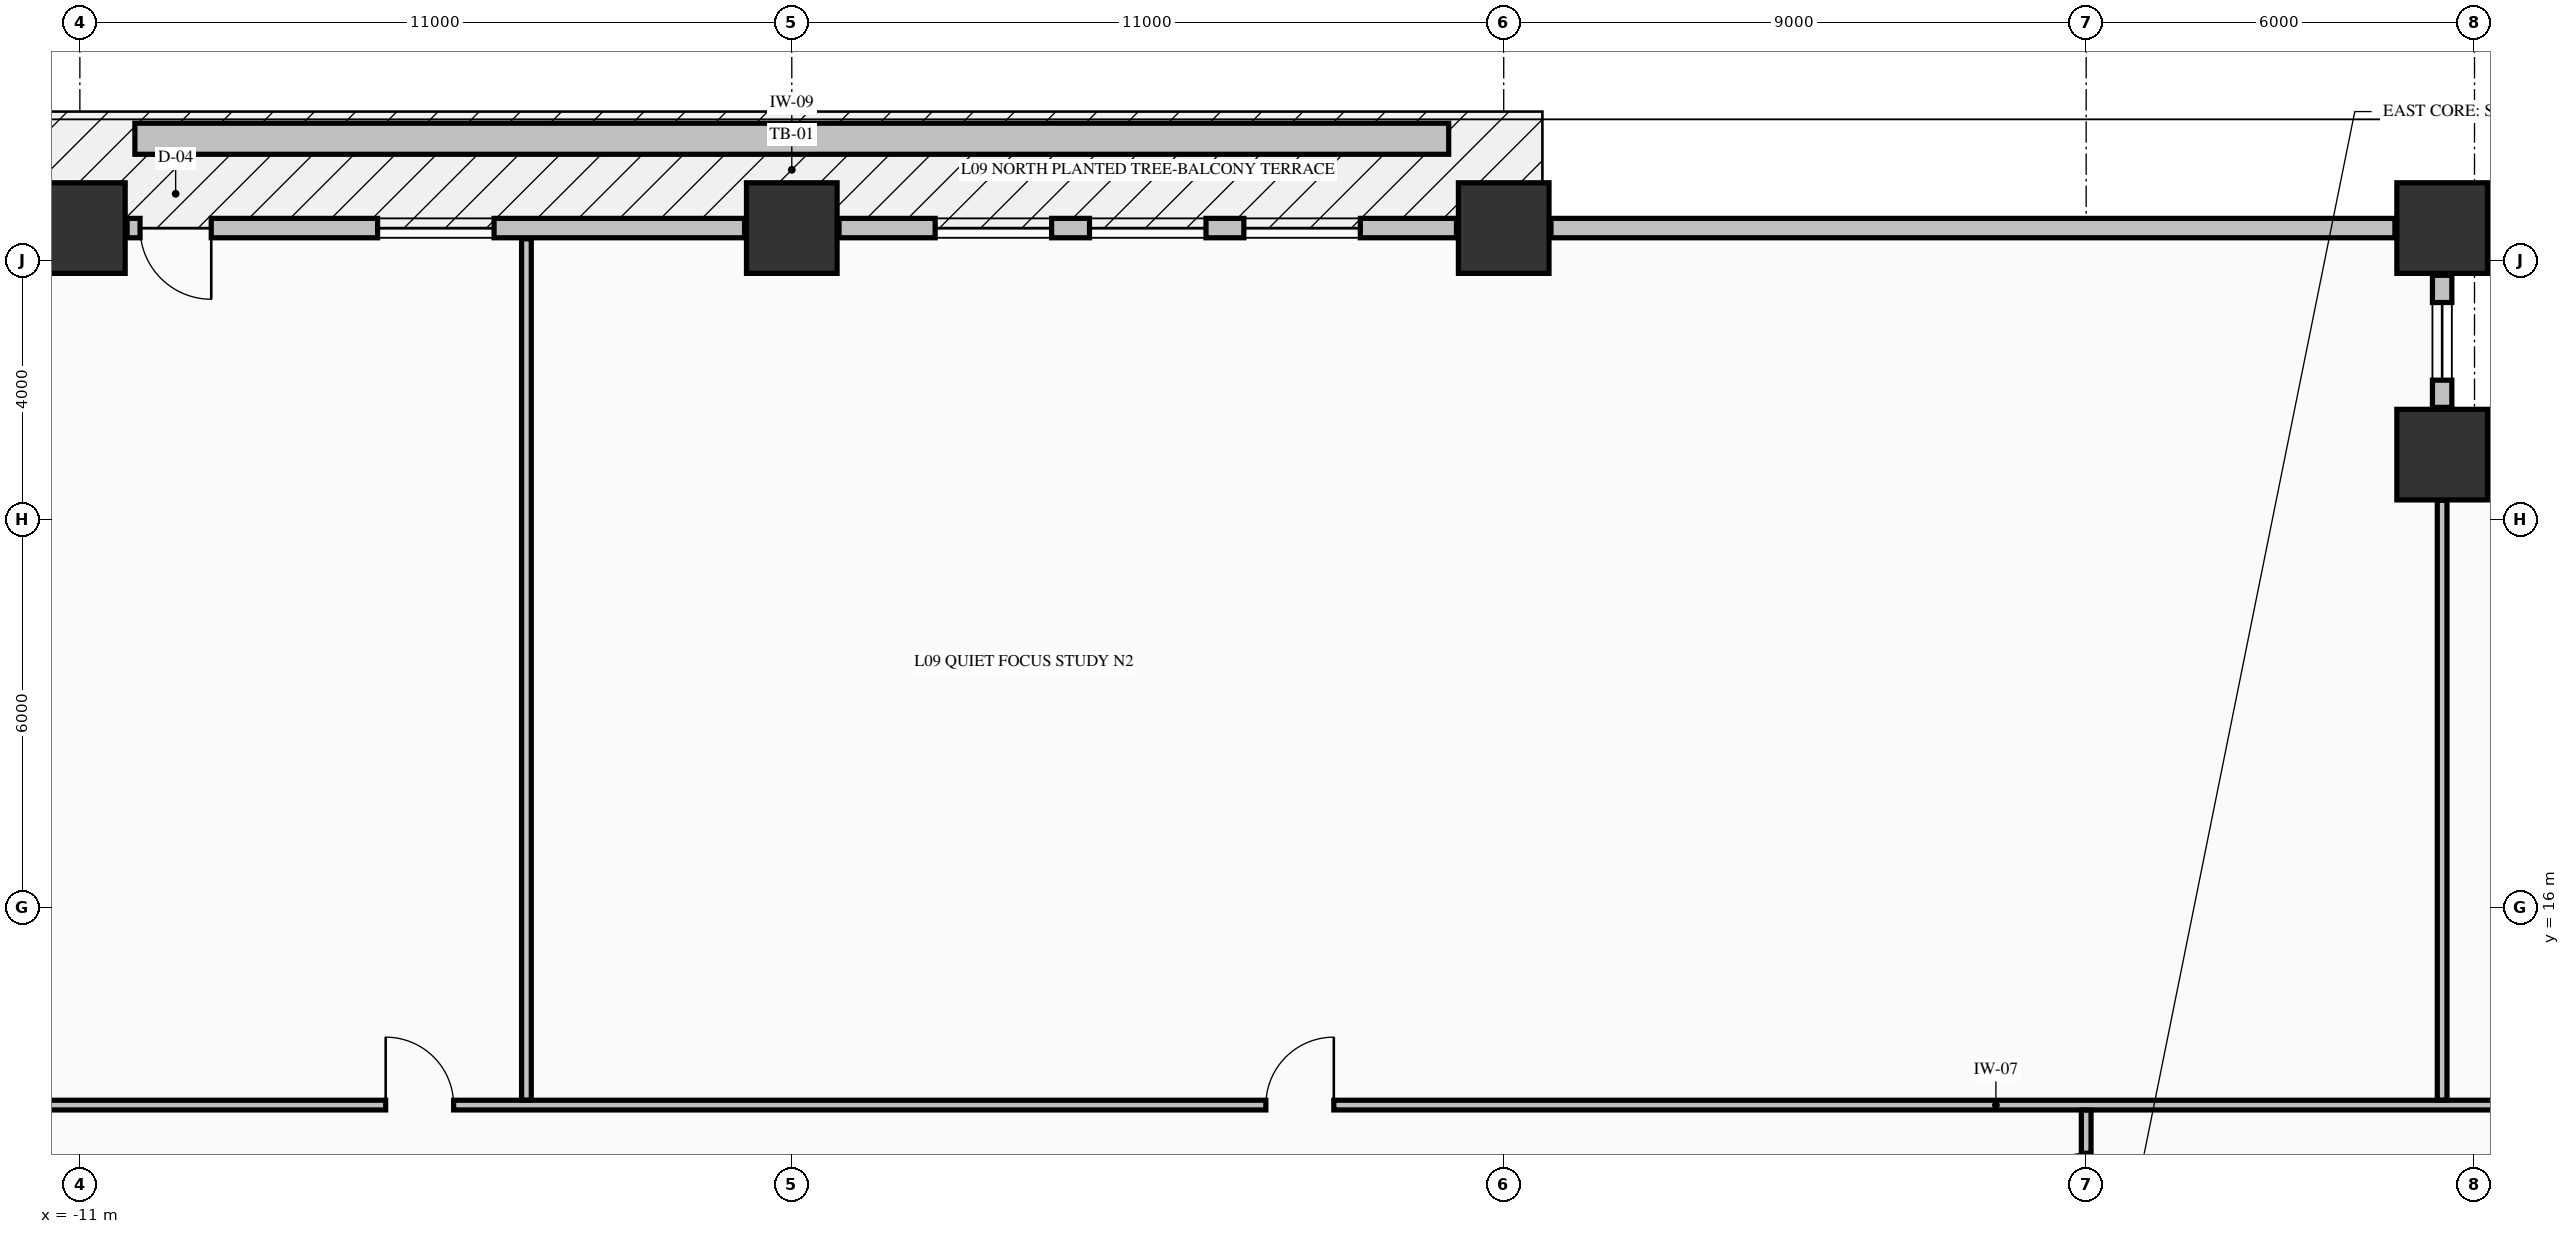
"""IFC4 building model, lengths in metres.
Left out: names, types, materials, properties, quantities, classifications, styles, units other than length and angle.
Written with IfcOpenShell. Run it as: python <this file> out.ifc"""

import sys

from ifc_helpers import new_model, si_unit, direction, frame, frame_2d, origin, origin_2d, place, context, subcontext, project, spatial, rectangle, extrude, element, fill, save


model = new_model("IFC4")
c1 = context("Model", 3, precision=1e-05, world=origin(), true_north=direction((0.0, 1.0)))
c2 = subcontext(c1, "Body", "Model", "MODEL_VIEW")
j1 = project(units=[si_unit("LENGTHUNIT", "METRE"), si_unit("PLANEANGLEUNIT", "RADIAN")], contexts=[c1])
p1 = place(None, origin())
s1 = spatial("IfcSite", under=j1, at=p1, CompositionType="ELEMENT")
p2 = place(p1, origin())
s2 = spatial("IfcBuilding", under=s1, at=p2, CompositionType="ELEMENT")
p3 = place(p2, frame((0.0, 0.0, 41.48)))
s3 = spatial("IfcBuildingStorey", under=s2, at=p3, CompositionType="ELEMENT", Elevation=41.48)
for number, where, z_axis, x_axis in (
    (1, (-11.0, 26.5, -0.25), (0.0, 0.0, 1.0), (1.0, 0.0, 0.0)),
    (2, (0.0, 26.5, -0.25), (0.0, 0.0, 1.0), (1.0, 0.0, 0.0)),
    (3, (11.0, 26.5, -0.25), (0.0, 0.0, 1.0), (1.0, 0.0, 0.0)),
    (4, (25.5, 26.5, -0.25), (0.0, 0.0, 1.0), (1.0, 0.0, 0.0)),
    (5, (25.5, 23.0, -0.25), (0.0, 0.0, 1.0), (1.0, 0.0, 0.0)),
):
    element("IfcColumn", number, at=place(p3, frame(where, z_axis=z_axis, x_axis=x_axis)), inside=s3, PredefinedType="COLUMN", context=c2, shape_type="SweptSolid", body=[
        extrude(rectangle(XDim=1.4, YDim=1.4, at=origin_2d()), origin(), (0.0, 0.0, 1.0), 3.57),
    ])
p4 = place(p3, frame((28.27, 23.0, 0.0), z_axis=(0.0, 0.0, 1.0), x_axis=(-1.0, 0.0, 0.0)))
e6 = element("IfcWall", 6, at=p4, inside=s3, PredefinedType="STANDARD", context=c2, shape_type="SweptSolid", body=[
    extrude(rectangle(XDim=2.04, YDim=0.3, at=frame_2d((1.02, 0.0))), origin(), (0.0, 0.0, 1.0), 2.712),
])
p5 = place(p4, frame((0.42, 0.0, 0.82)))
e7 = element("IfcOpeningElement", 7, at=p5, cuts=e6, PredefinedType="OPENING", context=c2, shape_type="SweptSolid", body=[
    extrude(rectangle(XDim=1.2, YDim=1.65, at=frame_2d((0.6, 0.825))), frame((0.0, 0.16, 0.0), z_axis=(0.0, -1.0, 0.0), x_axis=(1.0, 0.0, 0.0)), (0.0, 0.0, 1.0), 0.32),
])
p6 = place(p3, frame((25.5, 23.73, 0.0), z_axis=(0.0, 0.0, 1.0), x_axis=(0.0, 1.0, 0.0)))
e8 = element("IfcWall", 8, at=p6, inside=s3, PredefinedType="STANDARD", context=c2, shape_type="SweptSolid", body=[
    extrude(rectangle(XDim=2.04, YDim=0.3, at=frame_2d((1.02, 0.0))), origin(), (0.0, 0.0, 1.0), 2.712),
])
p7 = place(p6, frame((0.42, 0.0, 0.82)))
e9 = element("IfcOpeningElement", 9, at=p7, cuts=e8, PredefinedType="OPENING", context=c2, shape_type="SweptSolid", body=[
    extrude(rectangle(XDim=1.2, YDim=1.65, at=frame_2d((0.6, 0.825))), frame((0.0, 0.16, 0.0), z_axis=(0.0, -1.0, 0.0), x_axis=(1.0, 0.0, 0.0)), (0.0, 0.0, 1.0), 0.32),
])
p8 = place(p3, frame((-0.73, 26.5, 0.0), z_axis=(0.0, 0.0, 1.0), x_axis=(-1.0, 0.0, 0.0)))
e10 = element("IfcWall", 10, at=p8, inside=s3, PredefinedType="STANDARD", context=c2, shape_type="SweptSolid", body=[
    extrude(rectangle(XDim=9.54, YDim=0.3, at=frame_2d((4.77, 0.0))), origin(), (0.0, 0.0, 1.0), 2.712),
])
p9 = place(p8, frame((8.24, 0.0, 0.0)))
e11 = element("IfcOpeningElement", 11, at=p9, cuts=e10, PredefinedType="OPENING", context=c2, shape_type="SweptSolid", body=[
    extrude(rectangle(XDim=1.1, YDim=2.15, at=frame_2d((0.55, 1.075))), frame((0.0, 0.16, 0.0), z_axis=(0.0, -1.0, 0.0), x_axis=(1.0, 0.0, 0.0)), (0.0, 0.0, 1.0), 0.32),
])
p10 = place(p8, frame((3.87, 0.0, 0.78)))
e12 = element("IfcOpeningElement", 12, at=p10, cuts=e10, PredefinedType="OPENING", context=c2, shape_type="SweptSolid", body=[
    extrude(rectangle(XDim=1.8, YDim=1.72, at=frame_2d((0.9, 0.86))), frame((0.0, 0.16, 0.0), z_axis=(0.0, -1.0, 0.0), x_axis=(1.0, 0.0, 0.0)), (0.0, 0.0, 1.0), 0.32),
])
p11 = place(p3, frame((10.27, 26.5, 0.0), z_axis=(0.0, 0.0, 1.0), x_axis=(-1.0, 0.0, 0.0)))
e13 = element("IfcWall", 13, at=p11, inside=s3, PredefinedType="STANDARD", context=c2, shape_type="SweptSolid", body=[
    extrude(rectangle(XDim=9.54, YDim=0.3, at=frame_2d((4.77, 0.0))), origin(), (0.0, 0.0, 1.0), 2.712),
])
p12 = place(p11, frame((1.485, 0.0, 0.78)))
e14 = element("IfcOpeningElement", 14, at=p12, cuts=e13, PredefinedType="OPENING", context=c2, shape_type="SweptSolid", body=[
    extrude(rectangle(XDim=1.8, YDim=1.72, at=frame_2d((0.9, 0.86))), frame((0.0, 0.16, 0.0), z_axis=(0.0, -1.0, 0.0), x_axis=(1.0, 0.0, 0.0)), (0.0, 0.0, 1.0), 0.32),
])
p13 = place(p11, frame((3.87, 0.0, 0.78)))
e15 = element("IfcOpeningElement", 15, at=p13, cuts=e13, PredefinedType="OPENING", context=c2, shape_type="SweptSolid", body=[
    extrude(rectangle(XDim=1.8, YDim=1.72, at=frame_2d((0.9, 0.86))), frame((0.0, 0.16, 0.0), z_axis=(0.0, -1.0, 0.0), x_axis=(1.0, 0.0, 0.0)), (0.0, 0.0, 1.0), 0.32),
])
p14 = place(p11, frame((6.255, 0.0, 0.78)))
e16 = element("IfcOpeningElement", 16, at=p14, cuts=e13, PredefinedType="OPENING", context=c2, shape_type="SweptSolid", body=[
    extrude(rectangle(XDim=1.8, YDim=1.72, at=frame_2d((0.9, 0.86))), frame((0.0, 0.16, 0.0), z_axis=(0.0, -1.0, 0.0), x_axis=(1.0, 0.0, 0.0)), (0.0, 0.0, 1.0), 0.32),
])
p15 = place(p3, frame((24.77, 26.5, 0.0), z_axis=(0.0, 0.0, 1.0), x_axis=(-1.0, 0.0, 0.0)))
e17 = element("IfcWall", 17, at=p15, inside=s3, PredefinedType="STANDARD", context=c2, shape_type="SweptSolid", body=[
    extrude(rectangle(XDim=13.04, YDim=0.3, at=frame_2d((6.52, 0.0))), origin(), (0.0, 0.0, 1.0), 2.712),
])
p16 = place(p3, frame((-23.835, 12.95, 0.0), z_axis=(0.0, 0.0, 1.0), x_axis=(1.0, 0.0, 0.0)))
e18 = element("IfcWall", 18, at=p16, inside=s3, PredefinedType="PARTITIONING", context=c2, shape_type="SweptSolid", body=[
    extrude(rectangle(XDim=52.67, YDim=0.15, at=frame_2d((26.335, 0.0))), origin(), (0.0, 0.0, 1.0), 3.32),
])
p17 = place(p16, frame((17.56, 0.0, 0.0)))
e19 = element("IfcOpeningElement", 19, at=p17, cuts=e18, PredefinedType="OPENING", context=c2, shape_type="SweptSolid", body=[
    extrude(rectangle(XDim=1.05, YDim=2.15, at=frame_2d((0.525, 1.075))), frame((0.0, 0.085, 0.0), z_axis=(0.0, -1.0, 0.0), x_axis=(1.0, 0.0, 0.0)), (0.0, 0.0, 1.0), 0.17),
])
p18 = place(p16, frame((31.16, 0.0, 0.0)))
e20 = element("IfcOpeningElement", 20, at=p18, cuts=e18, PredefinedType="OPENING", context=c2, shape_type="SweptSolid", body=[
    extrude(rectangle(XDim=1.05, YDim=2.15, at=frame_2d((0.525, 1.075))), frame((0.0, 0.085, 0.0), z_axis=(0.0, -1.0, 0.0), x_axis=(1.0, 0.0, 0.0)), (0.0, 0.0, 1.0), 0.17),
])
p19 = place(p3, frame((-4.1, 13.028, 0.0), z_axis=(0.0, 0.0, 1.0), x_axis=(0.0, 1.0, 0.0)))
e21 = element("IfcWall", 21, at=p19, inside=s3, PredefinedType="PARTITIONING", context=c2, shape_type="SweptSolid", body=[
    extrude(rectangle(XDim=13.307, YDim=0.15, at=frame_2d((6.653, 0.0))), origin(), (0.0, 0.0, 1.0), 3.32),
])
p20 = place(p3, frame((20.0, 11.106, 0.0), z_axis=(0.0, 0.0, 1.0), x_axis=(0.0, 1.0, 0.0)))
e22 = element("IfcWall", 22, at=p20, inside=s3, PredefinedType="PARTITIONING", context=c2, shape_type="SweptSolid", body=[
    extrude(rectangle(XDim=1.766, YDim=0.15, at=frame_2d((0.883, 0.0))), origin(), (0.0, 0.0, 1.0), 2.66),
])
p21 = place(p20, frame((0.15, 0.0, 0.0)))
e23 = element("IfcOpeningElement", 23, at=p21, cuts=e22, PredefinedType="OPENING", context=c2, shape_type="SweptSolid", body=[
    extrude(rectangle(XDim=0.95, YDim=2.15, at=frame_2d((0.475, 1.075))), frame((0.0, 0.085, 0.0), z_axis=(0.0, -1.0, 0.0), x_axis=(1.0, 0.0, 0.0)), (0.0, 0.0, 1.0), 0.17),
])
p22 = place(p3, frame((25.5, 13.028, 0.0), z_axis=(0.0, 0.0, 1.0), x_axis=(0.0, 1.0, 0.0)))
e24 = element("IfcWall", 24, at=p22, inside=s3, PredefinedType="PARTITIONING", context=c2, shape_type="SweptSolid", body=[
    extrude(rectangle(XDim=9.266, YDim=0.15, at=frame_2d((4.633, 0.0))), origin(), (0.0, 0.0, 1.0), 3.32),
])
p23 = place(p3, frame((-10.15, 27.88, -0.04), z_axis=(0.0, 0.0, 1.0), x_axis=(1.0, 0.0, 0.0)))
e25 = element("IfcWall", 25, at=p23, inside=s3, PredefinedType="PARAPET", context=c2, shape_type="SweptSolid", body=[
    extrude(rectangle(XDim=20.3, YDim=0.48, at=frame_2d((10.15, 0.0))), origin(), (0.0, 0.0, 1.0), 0.52),
])
p24 = place(p7, origin())
e26 = element("IfcWindow", 26, at=p24, inside=s3, PartitioningType="SINGLE_PANEL", PredefinedType="WINDOW", context=c2, shape_type="SweptSolid", body=[
    extrude(rectangle(XDim=1.2, YDim=1.65, at=frame_2d((0.6, 0.825))), frame((0.0, 0.03, 0.0), z_axis=(0.0, -1.0, 0.0), x_axis=(1.0, 0.0, 0.0)), (0.0, 0.0, 1.0), 0.06),
])
fill(e9, e26)
p25 = place(p9, origin())
e27 = element("IfcDoor", 27, at=p25, inside=s3, OperationType="SINGLE_SWING_LEFT", PredefinedType="DOOR", context=c2, shape_type="SweptSolid", body=[
    extrude(rectangle(XDim=1.1, YDim=2.15, at=frame_2d((0.55, 1.075))), frame((0.0, 0.025, 0.0), z_axis=(0.0, -1.0, 0.0), x_axis=(1.0, 0.0, 0.0)), (0.0, 0.0, 1.0), 0.05),
])
fill(e11, e27)
p26 = place(p10, origin())
e28 = element("IfcWindow", 28, at=p26, inside=s3, PartitioningType="SINGLE_PANEL", PredefinedType="WINDOW", context=c2, shape_type="SweptSolid", body=[
    extrude(rectangle(XDim=1.8, YDim=1.72, at=frame_2d((0.9, 0.86))), frame((0.0, 0.03, 0.0), z_axis=(0.0, -1.0, 0.0), x_axis=(1.0, 0.0, 0.0)), (0.0, 0.0, 1.0), 0.06),
])
fill(e12, e28)
p27 = place(p12, origin())
e29 = element("IfcWindow", 29, at=p27, inside=s3, PartitioningType="SINGLE_PANEL", PredefinedType="WINDOW", context=c2, shape_type="SweptSolid", body=[
    extrude(rectangle(XDim=1.8, YDim=1.72, at=frame_2d((0.9, 0.86))), frame((0.0, 0.03, 0.0), z_axis=(0.0, -1.0, 0.0), x_axis=(1.0, 0.0, 0.0)), (0.0, 0.0, 1.0), 0.06),
])
fill(e14, e29)
p28 = place(p13, origin())
e30 = element("IfcWindow", 30, at=p28, inside=s3, PartitioningType="SINGLE_PANEL", PredefinedType="WINDOW", context=c2, shape_type="SweptSolid", body=[
    extrude(rectangle(XDim=1.8, YDim=1.72, at=frame_2d((0.9, 0.86))), frame((0.0, 0.03, 0.0), z_axis=(0.0, -1.0, 0.0), x_axis=(1.0, 0.0, 0.0)), (0.0, 0.0, 1.0), 0.06),
])
fill(e15, e30)
p29 = place(p14, origin())
e31 = element("IfcWindow", 31, at=p29, inside=s3, PartitioningType="SINGLE_PANEL", PredefinedType="WINDOW", context=c2, shape_type="SweptSolid", body=[
    extrude(rectangle(XDim=1.8, YDim=1.72, at=frame_2d((0.9, 0.86))), frame((0.0, 0.03, 0.0), z_axis=(0.0, -1.0, 0.0), x_axis=(1.0, 0.0, 0.0)), (0.0, 0.0, 1.0), 0.06),
])
fill(e16, e31)
p30 = place(p17, origin())
e32 = element("IfcDoor", 32, at=p30, inside=s3, OperationType="SINGLE_SWING_LEFT", PredefinedType="DOOR", context=c2, shape_type="SweptSolid", body=[
    extrude(rectangle(XDim=1.05, YDim=2.15, at=frame_2d((0.525, 1.075))), frame((0.0, 0.025, 0.0), z_axis=(0.0, -1.0, 0.0), x_axis=(1.0, 0.0, 0.0)), (0.0, 0.0, 1.0), 0.05),
])
fill(e19, e32)
p31 = place(p18, origin())
e33 = element("IfcDoor", 33, at=p31, inside=s3, OperationType="SINGLE_SWING_RIGHT", PredefinedType="DOOR", context=c2, shape_type="SweptSolid", body=[
    extrude(rectangle(XDim=1.05, YDim=2.15, at=frame_2d((0.525, 1.075))), frame((0.0, 0.025, 0.0), z_axis=(0.0, -1.0, 0.0), x_axis=(1.0, 0.0, 0.0)), (0.0, 0.0, 1.0), 0.05),
])
fill(e20, e33)
p32 = place(p21, origin())
e34 = element("IfcDoor", 34, at=p32, inside=s3, OperationType="SINGLE_SWING_LEFT", PredefinedType="DOOR", context=c2, shape_type="SweptSolid", body=[
    extrude(rectangle(XDim=0.95, YDim=2.15, at=frame_2d((0.475, 1.075))), frame((0.0, 0.025, 0.0), z_axis=(0.0, -1.0, 0.0), x_axis=(1.0, 0.0, 0.0)), (0.0, 0.0, 1.0), 0.05),
])
fill(e23, e34)
save(model, sys.argv[1])
